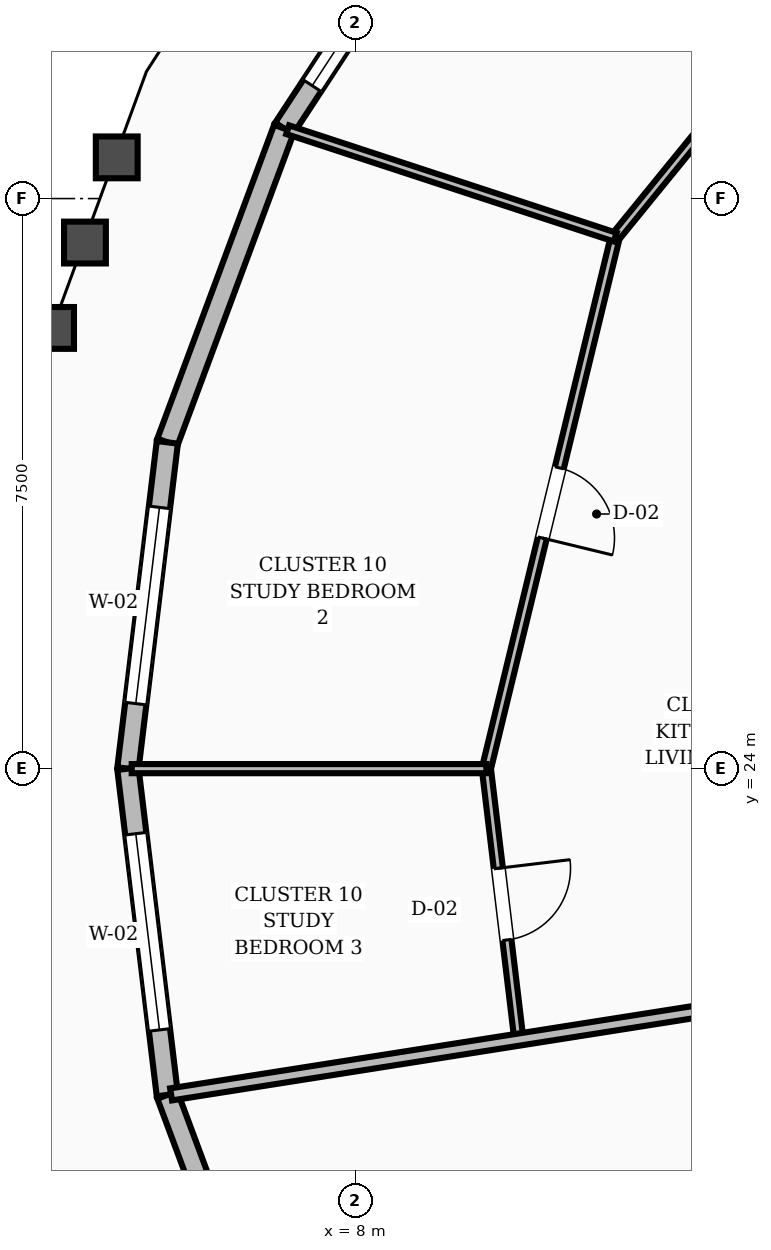
"""IFC4 building model, lengths in metres.
Left out: names, types, materials, properties, quantities, classifications, styles, units other than length and angle.
Written with IfcOpenShell. Run it as: python <this file> out.ifc"""

import sys

from ifc_helpers import new_model, si_unit, direction, frame, frame_2d, origin, place, context, subcontext, project, spatial, rectangle, extrude, element, fill, save


model = new_model("IFC4")
c1 = context("Model", 3, precision=1e-05, world=origin(), true_north=direction((0.0, 1.0)))
c2 = subcontext(c1, "Body", "Model", "MODEL_VIEW")
j1 = project(units=[si_unit("LENGTHUNIT", "METRE"), si_unit("PLANEANGLEUNIT", "RADIAN")], contexts=[c1])
p1 = place(None, origin())
s1 = spatial("IfcSite", under=j1, at=p1, CompositionType="ELEMENT")
p2 = place(p1, origin())
s2 = spatial("IfcBuilding", under=s1, at=p2, CompositionType="ELEMENT")
p3 = place(p2, frame((0.0, 0.0, 88.0)))
s3 = spatial("IfcBuildingStorey", under=s2, at=p3, CompositionType="ELEMENT", Elevation=88.0)
p4 = place(p3, frame((9.557, 36.226, 0.0), z_axis=(0.0, 0.0, 1.0), x_axis=(-0.548243756992, -0.836318589366, 0.0)))
e1 = element("IfcWall", 1, at=p4, inside=s3, PredefinedType="STANDARD", context=c2, shape_type="SweptSolid", body=[
    extrude(rectangle(XDim=4.549, YDim=0.28, at=frame_2d((2.275, 0.0))), origin(), (0.0, 0.0, 1.0), 2.71),
])
p5 = place(p4, frame((0.675, 0.0, 0.8)))
e2 = element("IfcOpeningElement", 2, at=p5, cuts=e1, PredefinedType="OPENING", context=c2, shape_type="SweptSolid", body=[
    extrude(rectangle(XDim=3.2, YDim=1.65, at=frame_2d((1.6, 0.825))), frame((0.0, 0.15, 0.0), z_axis=(0.0, -1.0, 0.0), x_axis=(1.0, 0.0, 0.0)), (0.0, 0.0, 1.0), 0.3),
])
p6 = place(p3, frame((7.063, 32.421, 0.0), z_axis=(0.0, 0.0, 1.0), x_axis=(-0.348747298865, -0.937216795376, 0.0)))
e3 = element("IfcWall", 3, at=p6, inside=s3, PredefinedType="STANDARD", context=c2, shape_type="SweptSolid", body=[
    extrude(rectangle(XDim=4.405, YDim=0.28, at=frame_2d((2.202, 0.0))), origin(), (0.0, 0.0, 1.0), 2.71),
])
p7 = place(p3, frame((5.527, 28.293, 0.0), z_axis=(0.0, 0.0, 1.0), x_axis=(-0.11991322244, -0.992784376934, 0.0)))
e4 = element("IfcWall", 4, at=p7, inside=s3, PredefinedType="STANDARD", context=c2, shape_type="SweptSolid", body=[
    extrude(rectangle(XDim=4.324, YDim=0.28, at=frame_2d((2.162, 0.0))), origin(), (0.0, 0.0, 1.0), 2.71),
])
p8 = place(p7, frame((0.862, 0.0, 0.8)))
e5 = element("IfcOpeningElement", 5, at=p8, cuts=e4, PredefinedType="OPENING", context=c2, shape_type="SweptSolid", body=[
    extrude(rectangle(XDim=2.6, YDim=1.65, at=frame_2d((1.3, 0.825))), frame((0.0, 0.15, 0.0), z_axis=(0.0, -1.0, 0.0), x_axis=(1.0, 0.0, 0.0)), (0.0, 0.0, 1.0), 0.3),
])
p9 = place(p3, frame((5.008, 24.0, 0.0), z_axis=(0.0, 0.0, 1.0), x_axis=(0.11991322244, -0.992784376934, 0.0)))
e6 = element("IfcWall", 6, at=p9, inside=s3, PredefinedType="STANDARD", context=c2, shape_type="SweptSolid", body=[
    extrude(rectangle(XDim=4.324, YDim=0.28, at=frame_2d((2.162, 0.0))), origin(), (0.0, 0.0, 1.0), 2.71),
])
p10 = place(p9, frame((0.862, 0.0, 0.8)))
e7 = element("IfcOpeningElement", 7, at=p10, cuts=e6, PredefinedType="OPENING", context=c2, shape_type="SweptSolid", body=[
    extrude(rectangle(XDim=2.6, YDim=1.65, at=frame_2d((1.3, 0.825))), frame((0.0, 0.15, 0.0), z_axis=(0.0, -1.0, 0.0), x_axis=(1.0, 0.0, 0.0)), (0.0, 0.0, 1.0), 0.3),
])
p11 = place(p3, frame((5.527, 19.707, 0.0), z_axis=(0.0, 0.0, 1.0), x_axis=(0.348747298865, -0.937216795376, 0.0)))
e8 = element("IfcWall", 8, at=p11, inside=s3, PredefinedType="STANDARD", context=c2, shape_type="SweptSolid", body=[
    extrude(rectangle(XDim=4.405, YDim=0.28, at=frame_2d((2.202, 0.0))), origin(), (0.0, 0.0, 1.0), 2.71),
])
p12 = place(p3, frame((16.249, 36.92, 0.0), z_axis=(0.0, 0.0, 1.0), x_axis=(-0.631582679141, -0.775308531753, 0.0)))
e9 = element("IfcWall", 9, at=p12, inside=s3, PredefinedType="PARTITIONING", context=c2, shape_type="SweptSolid", body=[
    extrude(rectangle(XDim=7.646, YDim=0.12, at=frame_2d((3.823, 0.0))), origin(), (0.0, 0.0, 1.0), 2.71),
])
p13 = place(p12, frame((4.627, 0.0, 0.0)))
e10 = element("IfcOpeningElement", 10, at=p13, cuts=e9, PredefinedType="OPENING", context=c2, shape_type="SweptSolid", body=[
    extrude(rectangle(XDim=0.95, YDim=2.1, at=frame_2d((0.475, 1.05))), frame((0.0, 0.07, 0.0), z_axis=(0.0, -1.0, 0.0), x_axis=(1.0, 0.0, 0.0)), (0.0, 0.0, 1.0), 0.14),
])
p14 = place(p3, frame((11.42, 30.992, 0.0), z_axis=(0.0, 0.0, 1.0), x_axis=(-0.235663152455, -0.971834800043, 0.0)))
e11 = element("IfcWall", 11, at=p14, inside=s3, PredefinedType="PARTITIONING", context=c2, shape_type="SweptSolid", body=[
    extrude(rectangle(XDim=7.195, YDim=0.12, at=frame_2d((3.597, 0.0))), origin(), (0.0, 0.0, 1.0), 2.71),
])
p15 = place(p14, frame((3.122, 0.0, 0.0)))
e12 = element("IfcOpeningElement", 12, at=p15, cuts=e11, PredefinedType="OPENING", context=c2, shape_type="SweptSolid", body=[
    extrude(rectangle(XDim=0.95, YDim=2.1, at=frame_2d((0.475, 1.05))), frame((0.0, 0.07, 0.0), z_axis=(0.0, -1.0, 0.0), x_axis=(1.0, 0.0, 0.0)), (0.0, 0.0, 1.0), 0.14),
])
p16 = place(p3, frame((11.42, 30.992, 0.0), z_axis=(0.0, 0.0, 1.0), x_axis=(-0.950185117796, 0.311686127247, 0.0)))
e13 = element("IfcWall", 13, at=p16, inside=s3, PredefinedType="PARTITIONING", context=c2, shape_type="SweptSolid", body=[
    extrude(rectangle(XDim=4.535, YDim=0.12, at=frame_2d((2.268, 0.0))), origin(), (0.0, 0.0, 1.0), 2.71),
])
p17 = place(p3, frame((9.724, 24.0, 0.0), z_axis=(0.0, 0.0, 1.0), x_axis=(0.119204211049, -0.992869757858, 0.0)))
e14 = element("IfcWall", 14, at=p17, inside=s3, PredefinedType="PARTITIONING", context=c2, shape_type="SweptSolid", body=[
    extrude(rectangle(XDim=3.59, YDim=0.12, at=frame_2d((1.795, 0.0))), origin(), (0.0, 0.0, 1.0), 2.71),
])
p18 = place(p17, frame((1.32, 0.0, 0.0)))
e15 = element("IfcOpeningElement", 15, at=p18, cuts=e14, PredefinedType="OPENING", context=c2, shape_type="SweptSolid", body=[
    extrude(rectangle(XDim=0.95, YDim=2.1, at=frame_2d((0.475, 1.05))), frame((0.0, 0.07, 0.0), z_axis=(0.0, -1.0, 0.0), x_axis=(1.0, 0.0, 0.0)), (0.0, 0.0, 1.0), 0.14),
])
p19 = place(p3, frame((9.724, 24.0, 0.0), z_axis=(0.0, 0.0, 1.0), x_axis=(-1.0, 0.0, 0.0)))
e16 = element("IfcWall", 16, at=p19, inside=s3, PredefinedType="PARTITIONING", context=c2, shape_type="SweptSolid", body=[
    extrude(rectangle(XDim=4.666, YDim=0.12, at=frame_2d((2.333, 0.0))), origin(), (0.0, 0.0, 1.0), 2.71),
])
p20 = place(p3, frame((16.039, 21.363, 0.0), z_axis=(0.0, 0.0, 1.0), x_axis=(-0.987817665594, -0.155615743231, 0.0)))
e17 = element("IfcWall", 17, at=p20, inside=s3, PredefinedType="SOLIDWALL", context=c2, shape_type="SweptSolid", body=[
    extrude(rectangle(XDim=10.592, YDim=0.16, at=frame_2d((5.296, 0.0))), origin(), (0.0, 0.0, 1.0), 2.71),
])
p21 = place(p5, origin())
e18 = element("IfcWindow", 18, at=p21, inside=s3, PartitioningType="SINGLE_PANEL", PredefinedType="WINDOW", context=c2, shape_type="SweptSolid", body=[
    extrude(rectangle(XDim=3.2, YDim=1.65, at=frame_2d((1.6, 0.825))), frame((0.0, 0.03, 0.0), z_axis=(0.0, -1.0, 0.0), x_axis=(1.0, 0.0, 0.0)), (0.0, 0.0, 1.0), 0.06),
])
fill(e2, e18)
p22 = place(p8, origin())
e19 = element("IfcWindow", 19, at=p22, inside=s3, PartitioningType="SINGLE_PANEL", PredefinedType="WINDOW", context=c2, shape_type="SweptSolid", body=[
    extrude(rectangle(XDim=2.6, YDim=1.65, at=frame_2d((1.3, 0.825))), frame((0.0, 0.03, 0.0), z_axis=(0.0, -1.0, 0.0), x_axis=(1.0, 0.0, 0.0)), (0.0, 0.0, 1.0), 0.06),
])
fill(e5, e19)
p23 = place(p10, origin())
e20 = element("IfcWindow", 20, at=p23, inside=s3, PartitioningType="SINGLE_PANEL", PredefinedType="WINDOW", context=c2, shape_type="SweptSolid", body=[
    extrude(rectangle(XDim=2.6, YDim=1.65, at=frame_2d((1.3, 0.825))), frame((0.0, 0.03, 0.0), z_axis=(0.0, -1.0, 0.0), x_axis=(1.0, 0.0, 0.0)), (0.0, 0.0, 1.0), 0.06),
])
fill(e7, e20)
p24 = place(p15, origin())
e21 = element("IfcDoor", 21, at=p24, inside=s3, OperationType="SINGLE_SWING_RIGHT", PredefinedType="DOOR", context=c2, shape_type="SweptSolid", body=[
    extrude(rectangle(XDim=0.95, YDim=2.1, at=frame_2d((0.475, 1.05))), frame((0.0, 0.025, 0.0), z_axis=(0.0, -1.0, 0.0), x_axis=(1.0, 0.0, 0.0)), (0.0, 0.0, 1.0), 0.05),
])
fill(e12, e21)
p25 = place(p18, origin())
e22 = element("IfcDoor", 22, at=p25, inside=s3, OperationType="SINGLE_SWING_LEFT", PredefinedType="DOOR", context=c2, shape_type="SweptSolid", body=[
    extrude(rectangle(XDim=0.95, YDim=2.1, at=frame_2d((0.475, 1.05))), frame((0.0, 0.025, 0.0), z_axis=(0.0, -1.0, 0.0), x_axis=(1.0, 0.0, 0.0)), (0.0, 0.0, 1.0), 0.05),
])
fill(e15, e22)
save(model, sys.argv[1])
